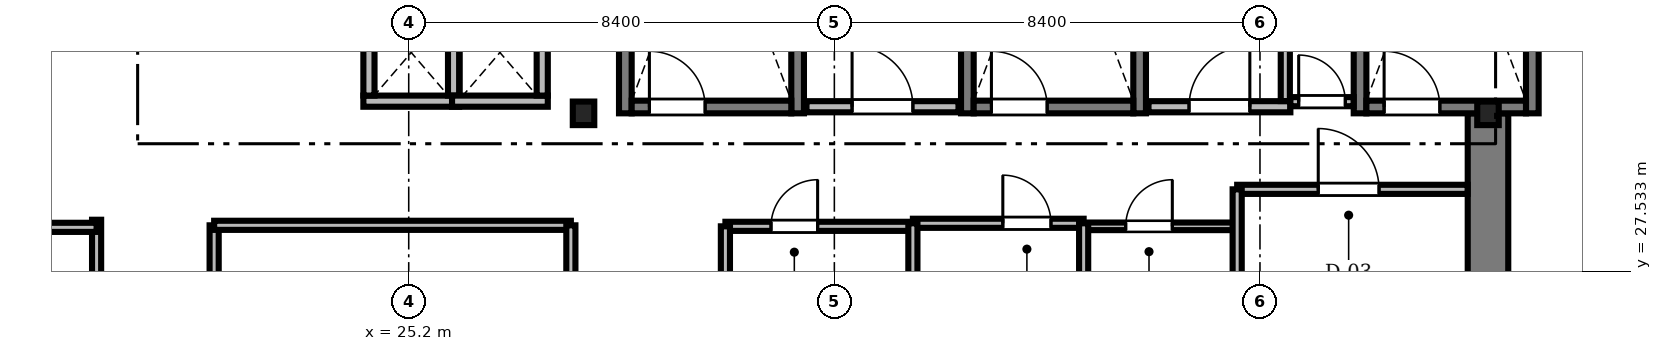
"""IFC4 building model, lengths in metres.
Left out: names, types, materials, properties, quantities, classifications, styles, units other than length and angle.
Written with IfcOpenShell. Run it as: python <this file> out.ifc"""

import sys

from ifc_helpers import new_model, si_unit, direction, frame, frame_2d, origin, origin_2d, place, context, subcontext, project, spatial, rectangle, i_section, extrude, source, transform, mapped, element, fill, save


model = new_model("IFC4")
c1 = context("Model", 3, precision=1e-05, world=origin(), true_north=direction((0.0, 1.0)))
c2 = subcontext(c1, "Body", "Model", "MODEL_VIEW")
j1 = project(units=[si_unit("LENGTHUNIT", "METRE"), si_unit("PLANEANGLEUNIT", "RADIAN")], contexts=[c1])
p1 = place(None, origin())
s1 = spatial("IfcSite", under=j1, at=p1, CompositionType="ELEMENT")
p2 = place(p1, origin())
s2 = spatial("IfcBuilding", under=s1, at=p2, CompositionType="ELEMENT")
p3 = place(p2, frame((0.0, 0.0, 115.0)))
s3 = spatial("IfcBuildingStorey", under=s2, at=p3, CompositionType="ELEMENT", Elevation=115.0)
m1 = source(origin(), c2, "Body", "SweptSolid", [
    extrude(rectangle(XDim=13.15, YDim=0.8, at=frame_2d((6.575, 0.0))), origin(), (0.0, 0.0, 1.0), 3.46),
])
p4 = place(p3, frame((46.5, 17.5, 0.0), z_axis=(0.0, 0.0, 1.0), x_axis=(0.0, 1.0, 0.0)))
e1 = element("IfcWall", 1, at=p4, inside=s3, PredefinedType="SHEAR", context=c2, shape_type="MappedRepresentation", body=[
    mapped(m1, transform((0.0, 0.0, 0.0), scale=1.0)),
])
m2 = source(origin(), c2, "Body", "SweptSolid", [
    extrude(i_section(OverallWidth=0.424, OverallDepth=0.465, WebThickness=0.035, FlangeThickness=0.056, FilletRadius=0.015, at=origin_2d()), origin(), (0.0, 0.0, 1.0), 3.46),
])
for number, where, z_axis, x_axis in (
    (2, (28.65, 30.65, 0.0), (0.0, 0.0, 1.0), (1.0, 0.0, 0.0)),
    (3, (46.5, 30.65, 0.0), (0.0, 0.0, 1.0), (1.0, 0.0, 0.0)),
):
    element("IfcColumn", number, at=place(p3, frame(where, z_axis=z_axis, x_axis=x_axis)), inside=s3, PredefinedType="COLUMN", context=c2, shape_type="MappedRepresentation", body=[
        mapped(m2, transform((0.0, 0.0, 0.0), scale=1.0)),
    ])
m3 = source(origin(), c2, "Body", "SweptSolid", [
    extrude(rectangle(XDim=9.25, YDim=0.25, at=frame_2d((4.625, 0.0))), origin(), (0.0, 0.0, 1.0), 3.5),
])
for number, where, z_axis, x_axis in (
    (4, (29.475, 30.65, 0.0), (0.0, 0.0, 1.0), (0.0, 1.0, 0.0)),
    (5, (32.875, 30.65, 0.0), (0.0, 0.0, 1.0), (0.0, 1.0, 0.0)),
):
    element("IfcWall", number, at=place(p3, frame(where, z_axis=z_axis, x_axis=x_axis)), inside=s3, PredefinedType="SOLIDWALL", context=c2, shape_type="MappedRepresentation", body=[
        mapped(m3, transform((0.0, 0.0, 0.0), scale=1.0)),
    ])
m4 = source(origin(), c2, "Body", "SweptSolid", [
    extrude(rectangle(XDim=3.15, YDim=0.25, at=frame_2d((1.575, 0.0))), origin(), (0.0, 0.0, 1.0), 3.5),
])
p5 = place(p3, frame((29.6, 30.775, 0.0), z_axis=(0.0, 0.0, 1.0), x_axis=(1.0, 0.0, 0.0)))
e6 = element("IfcWall", 6, at=p5, inside=s3, PredefinedType="SOLIDWALL", context=c2, shape_type="MappedRepresentation", body=[
    mapped(m4, transform((0.0, 0.0, 0.0), scale=1.0)),
])
m5 = source(origin(), c2, "Body", "SweptSolid", [
    extrude(rectangle(XDim=1.1, YDim=2.2, at=frame_2d((0.55, 1.1))), frame((0.0, 0.135, 0.0), z_axis=(0.0, -1.0, 0.0), x_axis=(1.0, 0.0, 0.0)), (0.0, 0.0, 1.0), 0.27),
])
p6 = place(p5, frame((0.35, 0.0, 0.0)))
e7 = element("IfcOpeningElement", 7, at=p6, cuts=e6, PredefinedType="OPENING", context=c2, shape_type="MappedRepresentation", body=[
    mapped(m5, transform((0.0, 0.0, 0.0), scale=1.0)),
])
for number, where, z_axis, x_axis in (
    (8, (36.225, 30.65, 0.0), (0.0, 0.0, 1.0), (0.0, 1.0, 0.0)),
    (9, (39.625, 30.65, 0.0), (0.0, 0.0, 1.0), (0.0, 1.0, 0.0)),
):
    element("IfcWall", number, at=place(p3, frame(where, z_axis=z_axis, x_axis=x_axis)), inside=s3, PredefinedType="SOLIDWALL", context=c2, shape_type="MappedRepresentation", body=[
        mapped(m3, transform((0.0, 0.0, 0.0), scale=1.0)),
    ])
p7 = place(p3, frame((36.35, 30.775, 0.0), z_axis=(0.0, 0.0, 1.0), x_axis=(1.0, 0.0, 0.0)))
e10 = element("IfcWall", 10, at=p7, inside=s3, PredefinedType="SOLIDWALL", context=c2, shape_type="MappedRepresentation", body=[
    mapped(m4, transform((0.0, 0.0, 0.0), scale=1.0)),
])
p8 = place(p7, frame((0.35, 0.0, 0.0)))
e11 = element("IfcOpeningElement", 11, at=p8, cuts=e10, PredefinedType="OPENING", context=c2, shape_type="MappedRepresentation", body=[
    mapped(m5, transform((0.0, 0.0, 0.0), scale=1.0)),
])
for number, where, z_axis, x_axis in (
    (12, (43.975, 30.65, 0.0), (0.0, 0.0, 1.0), (0.0, 1.0, 0.0)),
    (13, (47.375, 30.65, 0.0), (0.0, 0.0, 1.0), (0.0, 1.0, 0.0)),
):
    element("IfcWall", number, at=place(p3, frame(where, z_axis=z_axis, x_axis=x_axis)), inside=s3, PredefinedType="SOLIDWALL", context=c2, shape_type="MappedRepresentation", body=[
        mapped(m3, transform((0.0, 0.0, 0.0), scale=1.0)),
    ])
p9 = place(p3, frame((44.1, 30.775, 0.0), z_axis=(0.0, 0.0, 1.0), x_axis=(1.0, 0.0, 0.0)))
e14 = element("IfcWall", 14, at=p9, inside=s3, PredefinedType="SOLIDWALL", context=c2, shape_type="MappedRepresentation", body=[
    mapped(m4, transform((0.0, 0.0, 0.0), scale=1.0)),
])
p10 = place(p9, frame((0.35, 0.0, 0.0)))
e15 = element("IfcOpeningElement", 15, at=p10, cuts=e14, PredefinedType="OPENING", context=c2, shape_type="MappedRepresentation", body=[
    mapped(m5, transform((0.0, 0.0, 0.0), scale=1.0)),
])
m6 = source(origin(), c2, "Body", "SweptSolid", [
    extrude(rectangle(XDim=3.0, YDim=0.22, at=frame_2d((1.5, 0.0))), origin(), (0.0, 0.0, 1.0), 3.46),
])
p11 = place(p3, frame((33.05, 30.78, 0.0), z_axis=(0.0, 0.0, 1.0), x_axis=(1.0, 0.0, 0.0)))
e16 = element("IfcWall", 16, at=p11, inside=s3, PredefinedType="SOLIDWALL", context=c2, shape_type="MappedRepresentation", body=[
    mapped(m6, transform((0.0, 0.0, 0.0), scale=1.0)),
])
m7 = source(origin(), c2, "Body", "SweptSolid", [
    extrude(rectangle(XDim=1.2, YDim=2.2, at=frame_2d((0.6, 1.1))), frame((0.0, 0.12, 0.0), z_axis=(0.0, -1.0, 0.0), x_axis=(1.0, 0.0, 0.0)), (0.0, 0.0, 1.0), 0.24),
])
p12 = place(p11, frame((0.9, 0.0, 0.0)))
e17 = element("IfcOpeningElement", 17, at=p12, cuts=e16, PredefinedType="OPENING", context=c2, shape_type="MappedRepresentation", body=[
    mapped(m7, transform((0.0, 0.0, 0.0), scale=1.0)),
])
m8 = source(origin(), c2, "Body", "SweptSolid", [
    extrude(rectangle(XDim=2.8, YDim=0.22, at=frame_2d((1.4, 0.0))), origin(), (0.0, 0.0, 1.0), 3.46),
])
p13 = place(p3, frame((39.8, 30.78, 0.0), z_axis=(0.0, 0.0, 1.0), x_axis=(1.0, 0.0, 0.0)))
e18 = element("IfcWall", 18, at=p13, inside=s3, PredefinedType="SOLIDWALL", context=c2, shape_type="MappedRepresentation", body=[
    mapped(m8, transform((0.0, 0.0, 0.0), scale=1.0)),
])
p14 = place(p13, frame((0.8, 0.0, 0.0)))
e19 = element("IfcOpeningElement", 19, at=p14, cuts=e18, PredefinedType="OPENING", context=c2, shape_type="MappedRepresentation", body=[
    mapped(m7, transform((0.0, 0.0, 0.0), scale=1.0)),
])
m9 = source(origin(), c2, "Body", "SweptSolid", [
    extrude(rectangle(XDim=1.89, YDim=0.22, at=frame_2d((0.945, 0.0))), origin(), (0.0, 0.0, 1.0), 3.46),
])
p15 = place(p3, frame((24.305, 30.89, 0.0), z_axis=(0.0, 0.0, 1.0), x_axis=(1.0, 0.0, 0.0)))
e20 = element("IfcWall", 20, at=p15, inside=s3, PredefinedType="SOLIDWALL", context=c2, shape_type="MappedRepresentation", body=[
    mapped(m9, transform((0.0, 0.0, 0.0), scale=1.0)),
])
m10 = source(origin(), c2, "Body", "SweptSolid", [
    extrude(rectangle(XDim=1.7, YDim=0.22, at=frame_2d((0.85, 0.0))), origin(), (0.0, 0.0, 1.0), 3.46),
])
for number, where, z_axis, x_axis in (
    (21, (24.415, 31.0, 0.0), (0.0, 0.0, 1.0), (0.0, 1.0, 0.0)),
    (22, (26.085, 31.0, 0.0), (0.0, 0.0, 1.0), (0.0, 1.0, 0.0)),
):
    element("IfcWall", number, at=place(p3, frame(where, z_axis=z_axis, x_axis=x_axis)), inside=s3, PredefinedType="SOLIDWALL", context=c2, shape_type="MappedRepresentation", body=[
        mapped(m10, transform((0.0, 0.0, 0.0), scale=1.0)),
    ])
p16 = place(p3, frame((26.055, 30.89, 0.0), z_axis=(0.0, 0.0, 1.0), x_axis=(1.0, 0.0, 0.0)))
e23 = element("IfcWall", 23, at=p16, inside=s3, PredefinedType="SOLIDWALL", context=c2, shape_type="MappedRepresentation", body=[
    mapped(m9, transform((0.0, 0.0, 0.0), scale=1.0)),
])
p17 = place(p3, frame((27.835, 31.0, 0.0), z_axis=(0.0, 0.0, 1.0), x_axis=(0.0, 1.0, 0.0)))
e24 = element("IfcWall", 24, at=p17, inside=s3, PredefinedType="SOLIDWALL", context=c2, shape_type="MappedRepresentation", body=[
    mapped(m10, transform((0.0, 0.0, 0.0), scale=1.0)),
])
m11 = source(origin(), c2, "Body", "SweptSolid", [
    extrude(rectangle(XDim=14.6, YDim=0.18, at=frame_2d((7.3, 0.0))), origin(), (0.0, 0.0, 1.0), 2.852),
])
p18 = place(p3, frame((19.04, 13.95, 0.0), z_axis=(0.0, 0.0, 1.0), x_axis=(0.0, 1.0, 0.0)))
e25 = element("IfcWall", 25, at=p18, inside=s3, PredefinedType="PARTITIONING", context=c2, shape_type="MappedRepresentation", body=[
    mapped(m11, transform((0.0, 0.0, 0.0), scale=1.0)),
])
m12 = source(origin(), c2, "Body", "SweptSolid", [
    extrude(rectangle(XDim=1.05, YDim=2.2, at=frame_2d((0.525, 1.1))), frame((0.0, 0.1, 0.0), z_axis=(0.0, -1.0, 0.0), x_axis=(1.0, 0.0, 0.0)), (0.0, 0.0, 1.0), 0.2),
])
p19 = place(p18, frame((1.888, 0.0, 0.0)))
e26 = element("IfcOpeningElement", 26, at=p19, cuts=e25, PredefinedType="OPENING", context=c2, shape_type="MappedRepresentation", body=[
    mapped(m12, transform((0.0, 0.0, 0.0), scale=1.0)),
])
m13 = source(origin(), c2, "Body", "SweptSolid", [
    extrude(rectangle(XDim=0.95, YDim=2.15, at=frame_2d((0.475, 1.075))), frame((0.0, 0.1, 0.0), z_axis=(0.0, -1.0, 0.0), x_axis=(1.0, 0.0, 0.0)), (0.0, 0.0, 1.0), 0.2),
])
p20 = place(p18, frame((7.93, 0.0, 0.0)))
e27 = element("IfcOpeningElement", 27, at=p20, cuts=e25, PredefinedType="OPENING", context=c2, shape_type="MappedRepresentation", body=[
    mapped(m13, transform((0.0, 0.0, 0.0), scale=1.0)),
])
p21 = place(p18, frame((11.522, 0.0, 0.0)))
e28 = element("IfcOpeningElement", 28, at=p21, cuts=e25, PredefinedType="OPENING", context=c2, shape_type="MappedRepresentation", body=[
    mapped(m12, transform((0.0, 0.0, 0.0), scale=1.0)),
])
m14 = source(origin(), c2, "Body", "SweptSolid", [
    extrude(rectangle(XDim=4.548, YDim=0.18, at=frame_2d((2.274, 0.0))), origin(), (0.0, 0.0, 1.0), 3.092),
])
p22 = place(p3, frame((41.55, 29.15, 0.0), z_axis=(0.0, 0.0, 1.0), x_axis=(1.0, 0.0, 0.0)))
e29 = element("IfcWall", 29, at=p22, inside=s3, PredefinedType="PARTITIONING", context=c2, shape_type="MappedRepresentation", body=[
    mapped(m14, transform((0.0, 0.0, 0.0), scale=1.0)),
])
m15 = source(origin(), c2, "Body", "SweptSolid", [
    extrude(rectangle(XDim=1.2, YDim=2.2, at=frame_2d((0.6, 1.1))), frame((0.0, 0.1, 0.0), z_axis=(0.0, -1.0, 0.0), x_axis=(1.0, 0.0, 0.0)), (0.0, 0.0, 1.0), 0.2),
])
p23 = place(p22, frame((1.6, 0.0, 0.0)))
e30 = element("IfcOpeningElement", 30, at=p23, cuts=e29, PredefinedType="OPENING", context=c2, shape_type="MappedRepresentation", body=[
    mapped(m15, transform((0.0, 0.0, 0.0), scale=1.0)),
])
m16 = source(origin(), c2, "Body", "SweptSolid", [
    extrude(rectangle(XDim=4.24, YDim=0.18, at=frame_2d((2.12, 0.0))), origin(), (0.0, 0.0, 1.0), 2.852),
])
p24 = place(p3, frame((21.36, 24.2, 0.0), z_axis=(0.0, 0.0, 1.0), x_axis=(0.0, 1.0, 0.0)))
e31 = element("IfcWall", 31, at=p24, inside=s3, PredefinedType="PARTITIONING", context=c2, shape_type="MappedRepresentation", body=[
    mapped(m16, transform((0.0, 0.0, 0.0), scale=1.0)),
])
p25 = place(p24, frame((1.4, 0.0, 0.0)))
e32 = element("IfcOpeningElement", 32, at=p25, cuts=e31, PredefinedType="OPENING", context=c2, shape_type="MappedRepresentation", body=[
    mapped(m12, transform((0.0, 0.0, 0.0), scale=1.0)),
])
m17 = source(origin(), c2, "Body", "SweptSolid", [
    extrude(rectangle(XDim=3.7, YDim=0.18, at=frame_2d((1.85, 0.0))), origin(), (0.0, 0.0, 1.0), 3.092),
])
p26 = place(p3, frame((31.45, 28.42, 0.0), z_axis=(0.0, 0.0, 1.0), x_axis=(1.0, 0.0, 0.0)))
e33 = element("IfcWall", 33, at=p26, inside=s3, PredefinedType="PARTITIONING", context=c2, shape_type="MappedRepresentation", body=[
    mapped(m17, transform((0.0, 0.0, 0.0), scale=1.0)),
])
m18 = source(origin(), c2, "Body", "SweptSolid", [
    extrude(rectangle(XDim=0.92, YDim=2.1, at=frame_2d((0.46, 1.05))), frame((0.0, 0.1, 0.0), z_axis=(0.0, -1.0, 0.0), x_axis=(1.0, 0.0, 0.0)), (0.0, 0.0, 1.0), 0.2),
])
p27 = place(p26, frame((0.9, 0.0, 0.0)))
e34 = element("IfcOpeningElement", 34, at=p27, cuts=e33, PredefinedType="OPENING", context=c2, shape_type="MappedRepresentation", body=[
    mapped(m18, transform((0.0, 0.0, 0.0), scale=1.0)),
])
m19 = source(origin(), c2, "Body", "SweptSolid", [
    extrude(rectangle(XDim=3.37, YDim=0.18, at=frame_2d((1.685, 0.0))), origin(), (0.0, 0.0, 1.0), 3.46),
])
p28 = place(p3, frame((35.15, 28.48, 0.0), z_axis=(0.0, 0.0, 1.0), x_axis=(1.0, 0.0, 0.0)))
e35 = element("IfcWall", 35, at=p28, inside=s3, PredefinedType="PARTITIONING", context=c2, shape_type="MappedRepresentation", body=[
    mapped(m19, transform((0.0, 0.0, 0.0), scale=1.0)),
])
p29 = place(p28, frame((1.775, 0.0, 0.0)))
e36 = element("IfcOpeningElement", 36, at=p29, cuts=e35, PredefinedType="OPENING", context=c2, shape_type="MappedRepresentation", body=[
    mapped(m13, transform((0.0, 0.0, 0.0), scale=1.0)),
])
m20 = source(origin(), c2, "Body", "SweptSolid", [
    extrude(rectangle(XDim=3.0, YDim=0.15, at=frame_2d((1.5, 0.0))), origin(), (0.0, 0.0, 1.0), 3.46),
])
p30 = place(p3, frame((38.52, 28.42, 0.0), z_axis=(0.0, 0.0, 1.0), x_axis=(1.0, 0.0, 0.0)))
e37 = element("IfcWall", 37, at=p30, inside=s3, PredefinedType="PARTITIONING", context=c2, shape_type="MappedRepresentation", body=[
    mapped(m20, transform((0.0, 0.0, 0.0), scale=1.0)),
])
m21 = source(origin(), c2, "Body", "SweptSolid", [
    extrude(rectangle(XDim=0.92, YDim=2.1, at=frame_2d((0.46, 1.05))), frame((0.0, 0.085, 0.0), z_axis=(0.0, -1.0, 0.0), x_axis=(1.0, 0.0, 0.0)), (0.0, 0.0, 1.0), 0.17),
])
p31 = place(p30, frame((0.83, 0.0, 0.0)))
e38 = element("IfcOpeningElement", 38, at=p31, cuts=e37, PredefinedType="OPENING", context=c2, shape_type="MappedRepresentation", body=[
    mapped(m21, transform((0.0, 0.0, 0.0), scale=1.0)),
])
m22 = source(origin(), c2, "Body", "SweptSolid", [
    extrude(rectangle(XDim=1.248, YDim=0.18, at=frame_2d((0.624, 0.0))), origin(), (0.0, 0.0, 1.0), 3.46),
])
p32 = place(p3, frame((42.6, 30.88, 0.0), z_axis=(0.0, 0.0, 1.0), x_axis=(1.0, 0.0, 0.0)))
e39 = element("IfcWall", 39, at=p32, inside=s3, PredefinedType="PARTITIONING", context=c2, shape_type="MappedRepresentation", body=[
    mapped(m22, transform((0.0, 0.0, 0.0), scale=1.0)),
])
p33 = place(p32, frame((0.164, 0.0, 0.0)))
e40 = element("IfcOpeningElement", 40, at=p33, cuts=e39, PredefinedType="OPENING", context=c2, shape_type="MappedRepresentation", body=[
    mapped(m18, transform((0.0, 0.0, 0.0), scale=1.0)),
])
m23 = source(origin(), c2, "Body", "SweptSolid", [
    extrude(rectangle(XDim=12.31, YDim=0.18, at=frame_2d((6.155, 0.0))), origin(), (0.0, 0.0, 1.0), 2.702),
])
p34 = place(p3, frame((6.73, 28.4, 0.0), z_axis=(0.0, 0.0, 1.0), x_axis=(1.0, 0.0, 0.0)))
e41 = element("IfcWall", 41, at=p34, inside=s3, PredefinedType="PARTITIONING", context=c2, shape_type="MappedRepresentation", body=[
    mapped(m23, transform((0.0, 0.0, 0.0), scale=1.0)),
])
m24 = source(origin(), c2, "Body", "SweptSolid", [
    extrude(rectangle(XDim=7.04, YDim=0.18, at=frame_2d((3.52, 0.0))), origin(), (0.0, 0.0, 1.0), 3.46),
])
p35 = place(p3, frame((21.36, 28.44, 0.0), z_axis=(0.0, 0.0, 1.0), x_axis=(1.0, 0.0, 0.0)))
e42 = element("IfcWall", 42, at=p35, inside=s3, PredefinedType="PARTITIONING", context=c2, shape_type="MappedRepresentation", body=[
    mapped(m24, transform((0.0, 0.0, 0.0), scale=1.0)),
])
p36 = place(p3, frame((28.4, 24.2, 0.0), z_axis=(0.0, 0.0, 1.0), x_axis=(0.0, 1.0, 0.0)))
e43 = element("IfcWall", 43, at=p36, inside=s3, PredefinedType="PARTITIONING", context=c2, shape_type="MappedRepresentation", body=[
    mapped(m16, transform((0.0, 0.0, 0.0), scale=1.0)),
])
m25 = source(origin(), c2, "Body", "SweptSolid", [
    extrude(rectangle(XDim=2.35, YDim=0.18, at=frame_2d((1.175, 0.0))), origin(), (0.0, 0.0, 1.0), 2.852),
])
p37 = place(p3, frame((41.55, 26.8, 0.0), z_axis=(0.0, 0.0, 1.0), x_axis=(0.0, 1.0, 0.0)))
e44 = element("IfcWall", 44, at=p37, inside=s3, PredefinedType="PARTITIONING", context=c2, shape_type="MappedRepresentation", body=[
    mapped(m25, transform((0.0, 0.0, 0.0), scale=1.0)),
])
m26 = source(origin(), c2, "Body", "SweptSolid", [
    extrude(rectangle(XDim=1.858, YDim=0.18, at=frame_2d((0.929, 0.0))), origin(), (0.0, 0.0, 1.0), 3.46),
])
p38 = place(p3, frame((42.5, 30.892, 0.0), z_axis=(0.0, 0.0, 1.0), x_axis=(0.0, 1.0, 0.0)))
e45 = element("IfcWall", 45, at=p38, inside=s3, PredefinedType="PARTITIONING", context=c2, shape_type="MappedRepresentation", body=[
    mapped(m26, transform((0.0, 0.0, 0.0), scale=1.0)),
])
m27 = source(origin(), c2, "Body", "SweptSolid", [
    extrude(rectangle(XDim=1.66, YDim=0.18, at=frame_2d((0.83, 0.0))), origin(), (0.0, 0.0, 1.0), 3.002),
])
for number, where, z_axis, x_axis in (
    (46, (35.15, 26.82, 0.0), (0.0, 0.0, 1.0), (0.0, 1.0, 0.0)),
    (47, (38.52, 26.82, 0.0), (0.0, 0.0, 1.0), (0.0, 1.0, 0.0)),
):
    element("IfcWall", number, at=place(p3, frame(where, z_axis=z_axis, x_axis=x_axis)), inside=s3, PredefinedType="PARTITIONING", context=c2, shape_type="MappedRepresentation", body=[
        mapped(m27, transform((0.0, 0.0, 0.0), scale=1.0)),
    ])
m28 = source(origin(), c2, "Body", "SweptSolid", [
    extrude(rectangle(XDim=1.6, YDim=0.18, at=frame_2d((0.8, 0.0))), origin(), (0.0, 0.0, 1.0), 3.002),
])
p39 = place(p3, frame((31.45, 26.82, 0.0), z_axis=(0.0, 0.0, 1.0), x_axis=(0.0, 1.0, 0.0)))
e48 = element("IfcWall", 48, at=p39, inside=s3, PredefinedType="PARTITIONING", context=c2, shape_type="MappedRepresentation", body=[
    mapped(m28, transform((0.0, 0.0, 0.0), scale=1.0)),
])
m29 = source(origin(), c2, "Body", "SweptSolid", [
    extrude(rectangle(XDim=1.1, YDim=2.2, at=frame_2d((0.55, 1.1))), frame((0.0, 0.025, 0.0), z_axis=(0.0, -1.0, 0.0), x_axis=(1.0, 0.0, 0.0)), (0.0, 0.0, 1.0), 0.05),
])
p40 = place(p6, origin())
e49 = element("IfcDoor", 49, at=p40, inside=s3, OperationType="SINGLE_SWING_LEFT", PredefinedType="DOOR", context=c2, shape_type="MappedRepresentation", body=[
    mapped(m29, transform((0.0, 0.0, 0.0), scale=1.0)),
])
fill(e7, e49)
p41 = place(p8, origin())
e50 = element("IfcDoor", 50, at=p41, inside=s3, OperationType="SINGLE_SWING_LEFT", PredefinedType="DOOR", context=c2, shape_type="MappedRepresentation", body=[
    mapped(m29, transform((0.0, 0.0, 0.0), scale=1.0)),
])
fill(e11, e50)
p42 = place(p10, origin())
e51 = element("IfcDoor", 51, at=p42, inside=s3, OperationType="SINGLE_SWING_LEFT", PredefinedType="DOOR", context=c2, shape_type="MappedRepresentation", body=[
    mapped(m29, transform((0.0, 0.0, 0.0), scale=1.0)),
])
fill(e15, e51)
m30 = source(origin(), c2, "Body", "SweptSolid", [
    extrude(rectangle(XDim=1.2, YDim=2.2, at=frame_2d((0.6, 1.1))), frame((0.0, 0.025, 0.0), z_axis=(0.0, -1.0, 0.0), x_axis=(1.0, 0.0, 0.0)), (0.0, 0.0, 1.0), 0.05),
])
p43 = place(p12, origin())
e52 = element("IfcDoor", 52, at=p43, inside=s3, OperationType="SINGLE_SWING_LEFT", PredefinedType="DOOR", context=c2, shape_type="MappedRepresentation", body=[
    mapped(m30, transform((0.0, 0.0, 0.0), scale=1.0)),
])
fill(e17, e52)
p44 = place(p14, origin())
e53 = element("IfcDoor", 53, at=p44, inside=s3, OperationType="SINGLE_SWING_RIGHT", PredefinedType="DOOR", context=c2, shape_type="MappedRepresentation", body=[
    mapped(m30, transform((0.0, 0.0, 0.0), scale=1.0)),
])
fill(e19, e53)
p45 = place(p23, origin())
e54 = element("IfcDoor", 54, at=p45, inside=s3, OperationType="SINGLE_SWING_LEFT", PredefinedType="DOOR", context=c2, shape_type="MappedRepresentation", body=[
    mapped(m30, transform((0.0, 0.0, 0.0), scale=1.0)),
])
fill(e30, e54)
m31 = source(origin(), c2, "Body", "SweptSolid", [
    extrude(rectangle(XDim=0.92, YDim=2.1, at=frame_2d((0.46, 1.05))), frame((0.0, 0.025, 0.0), z_axis=(0.0, -1.0, 0.0), x_axis=(1.0, 0.0, 0.0)), (0.0, 0.0, 1.0), 0.05),
])
p46 = place(p27, origin())
e55 = element("IfcDoor", 55, at=p46, inside=s3, OperationType="SINGLE_SWING_RIGHT", PredefinedType="DOOR", context=c2, shape_type="MappedRepresentation", body=[
    mapped(m31, transform((0.0, 0.0, 0.0), scale=1.0)),
])
fill(e34, e55)
m32 = source(origin(), c2, "Body", "SweptSolid", [
    extrude(rectangle(XDim=0.95, YDim=2.15, at=frame_2d((0.475, 1.075))), frame((0.0, 0.025, 0.0), z_axis=(0.0, -1.0, 0.0), x_axis=(1.0, 0.0, 0.0)), (0.0, 0.0, 1.0), 0.05),
])
p47 = place(p29, origin())
e56 = element("IfcDoor", 56, at=p47, inside=s3, OperationType="SINGLE_SWING_LEFT", PredefinedType="DOOR", context=c2, shape_type="MappedRepresentation", body=[
    mapped(m32, transform((0.0, 0.0, 0.0), scale=1.0)),
])
fill(e36, e56)
p48 = place(p31, origin())
e57 = element("IfcDoor", 57, at=p48, inside=s3, OperationType="SINGLE_SWING_RIGHT", PredefinedType="DOOR", context=c2, shape_type="MappedRepresentation", body=[
    mapped(m31, transform((0.0, 0.0, 0.0), scale=1.0)),
])
fill(e38, e57)
p49 = place(p33, origin())
e58 = element("IfcDoor", 58, at=p49, inside=s3, OperationType="SINGLE_SWING_LEFT", PredefinedType="DOOR", context=c2, shape_type="MappedRepresentation", body=[
    mapped(m31, transform((0.0, 0.0, 0.0), scale=1.0)),
])
fill(e40, e58)
save(model, sys.argv[1])
